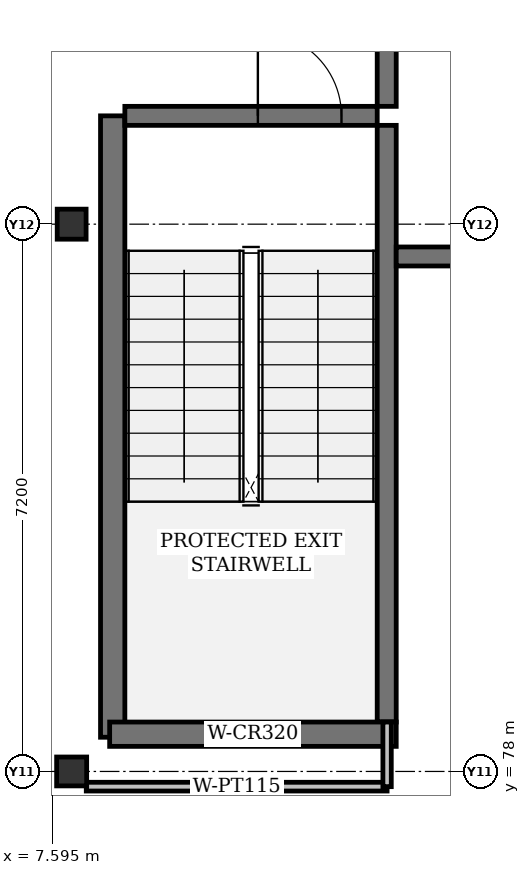
"""IFC4 building model, lengths in metres.
Left out: names, types, materials, properties, quantities, classifications, styles, units other than length and angle.
Written with IfcOpenShell. Run it as: python <this file> out.ifc"""

import sys

from ifc_helpers import new_model, si_unit, direction, frame, frame_2d, origin, origin_2d, place, context, subcontext, project, spatial, rectangle, i_section, extrude, element, fill, save


model = new_model("IFC4")
c1 = context("Model", 3, precision=1e-05, world=origin(), true_north=direction((0.0, 1.0)))
c2 = subcontext(c1, "Body", "Model", "MODEL_VIEW")
j1 = project(units=[si_unit("LENGTHUNIT", "METRE"), si_unit("PLANEANGLEUNIT", "RADIAN")], contexts=[c1])
p1 = place(None, origin())
s1 = spatial("IfcSite", under=j1, at=p1, CompositionType="ELEMENT")
p2 = place(p1, origin())
s2 = spatial("IfcBuilding", under=s1, at=p2, CompositionType="ELEMENT")
p3 = place(p2, frame((0.0, 0.0, 18.3)))
s3 = spatial("IfcBuildingStorey", under=s2, at=p3, CompositionType="ELEMENT", Elevation=18.3)
for number, where, z_axis, x_axis in (
    (1, (7.85, 78.0, 0.0), (0.0, 0.0, 1.0), (1.0, 0.0, 0.0)),
    (2, (7.85, 85.2, 0.0), (0.0, 0.0, 1.0), (0.0, 1.0, 0.0)),
):
    element("IfcColumn", number, at=place(p3, frame(where, z_axis=z_axis, x_axis=x_axis)), inside=s3, PredefinedType="COLUMN", context=c2, shape_type="SweptSolid", body=[
        extrude(i_section(OverallWidth=0.395, OverallDepth=0.38, WebThickness=0.019, FlangeThickness=0.03, FilletRadius=0.015, at=origin_2d()), origin(), (0.0, 0.0, 1.0), 4.2),
    ])
p4 = place(p3, frame((8.39, 78.45, 0.0), z_axis=(0.0, 0.0, 1.0), x_axis=(0.0, 1.0, 0.0)))
e3 = element("IfcWall", 3, at=p4, inside=s3, PredefinedType="SHEAR", context=c2, shape_type="SweptSolid", body=[
    extrude(rectangle(XDim=8.175, YDim=0.32, at=frame_2d((4.087, 0.0))), origin(), (0.0, 0.0, 1.0), 4.2),
])
p5 = place(p3, frame((11.995, 78.65, 0.0), z_axis=(0.0, 0.0, 1.0), x_axis=(0.0, 1.0, 0.0)))
e4 = element("IfcWall", 4, at=p5, inside=s3, PredefinedType="SHEAR", context=c2, shape_type="SweptSolid", body=[
    extrude(rectangle(XDim=7.85, YDim=0.25, at=frame_2d((3.925, 0.0))), origin(), (0.0, 0.0, 1.0), 4.2),
])
p6 = place(p3, frame((11.995, 86.75, 0.0), z_axis=(0.0, 0.0, 1.0), x_axis=(0.0, 1.0, 0.0)))
e5 = element("IfcWall", 5, at=p6, inside=s3, PredefinedType="SHEAR", context=c2, shape_type="SweptSolid", body=[
    extrude(rectangle(XDim=3.9, YDim=0.25, at=frame_2d((1.95, 0.0))), origin(), (0.0, 0.0, 1.0), 4.2),
])
p7 = place(p6, frame((1.3, 0.0, 0.0)))
e6 = element("IfcOpeningElement", 6, at=p7, cuts=e5, PredefinedType="OPENING", context=c2, shape_type="SweptSolid", body=[
    extrude(rectangle(XDim=1.25, YDim=2.2, at=frame_2d((0.625, 1.1))), frame((0.0, 0.125, 0.0), z_axis=(0.0, -1.0, 0.0), x_axis=(1.0, 0.0, 0.0)), (0.0, 0.0, 1.0), 0.25),
])
p8 = place(p3, frame((8.35, 78.49, 0.0), z_axis=(0.0, 0.0, 1.0), x_axis=(1.0, 0.0, 0.0)))
e7 = element("IfcWall", 7, at=p8, inside=s3, PredefinedType="SHEAR", context=c2, shape_type="SweptSolid", body=[
    extrude(rectangle(XDim=3.77, YDim=0.32, at=frame_2d((1.885, 0.0))), origin(), (0.0, 0.0, 1.0), 4.2),
])
p9 = place(p3, frame((8.55, 86.625, 0.0), z_axis=(0.0, 0.0, 1.0), x_axis=(1.0, 0.0, 0.0)))
e8 = element("IfcWall", 8, at=p9, inside=s3, PredefinedType="SHEAR", context=c2, shape_type="SweptSolid", body=[
    extrude(rectangle(XDim=3.32, YDim=0.25, at=frame_2d((1.66, 0.0))), origin(), (0.0, 0.0, 1.0), 4.2),
])
p10 = place(p9, frame((1.75, 0.0, 0.0)))
e9 = element("IfcOpeningElement", 9, at=p10, cuts=e8, PredefinedType="OPENING", context=c2, shape_type="SweptSolid", body=[
    extrude(rectangle(XDim=1.1, YDim=2.15, at=frame_2d((0.55, 1.075))), frame((0.0, 0.125, 0.0), z_axis=(0.0, -1.0, 0.0), x_axis=(1.0, 0.0, 0.0)), (0.0, 0.0, 1.0), 0.25),
])
p11 = place(p3, frame((12.12, 84.775, 0.0), z_axis=(0.0, 0.0, 1.0), x_axis=(1.0, 0.0, 0.0)))
e10 = element("IfcWall", 10, at=p11, inside=s3, PredefinedType="SHEAR", context=c2, shape_type="SweptSolid", body=[
    extrude(rectangle(XDim=4.03, YDim=0.25, at=frame_2d((2.015, 0.0))), origin(), (0.0, 0.0, 1.0), 4.2),
])
p12 = place(p11, frame((1.3, 0.0, 0.0)))
e11 = element("IfcOpeningElement", 11, at=p12, cuts=e10, PredefinedType="OPENING", context=c2, shape_type="SweptSolid", body=[
    extrude(rectangle(XDim=1.4, YDim=2.25, at=frame_2d((0.7, 1.125))), frame((0.0, 0.125, 0.0), z_axis=(0.0, -1.0, 0.0), x_axis=(1.0, 0.0, 0.0)), (0.0, 0.0, 1.0), 0.25),
])
p13 = place(p3, frame((8.042, 77.8, 0.0), z_axis=(0.0, 0.0, 1.0), x_axis=(1.0, 0.0, 0.0)))
e12 = element("IfcWall", 12, at=p13, inside=s3, PredefinedType="PARTITIONING", context=c2, shape_type="SweptSolid", body=[
    extrude(rectangle(XDim=3.958, YDim=0.115, at=frame_2d((1.979, 0.0))), origin(), (0.0, 0.0, 1.0), 3.451),
])
p14 = place(p3, frame((12.0, 77.8, 0.0), z_axis=(0.0, 0.0, 1.0), x_axis=(0.0, 1.0, 0.0)))
e13 = element("IfcWall", 13, at=p14, inside=s3, PredefinedType="PARTITIONING", context=c2, shape_type="SweptSolid", body=[
    extrude(rectangle(XDim=0.85, YDim=0.11, at=frame_2d((0.425, 0.0))), origin(), (0.0, 0.0, 1.0), 3.451),
])
p15 = place(p10, origin())
e14 = element("IfcDoor", 14, at=p15, inside=s3, OperationType="SINGLE_SWING_LEFT", PredefinedType="DOOR", context=c2, shape_type="SweptSolid", body=[
    extrude(rectangle(XDim=1.1, YDim=2.15, at=frame_2d((0.55, 1.075))), frame((0.0, 0.025, 0.0), z_axis=(0.0, -1.0, 0.0), x_axis=(1.0, 0.0, 0.0)), (0.0, 0.0, 1.0), 0.05),
])
fill(e9, e14)
save(model, sys.argv[1])
